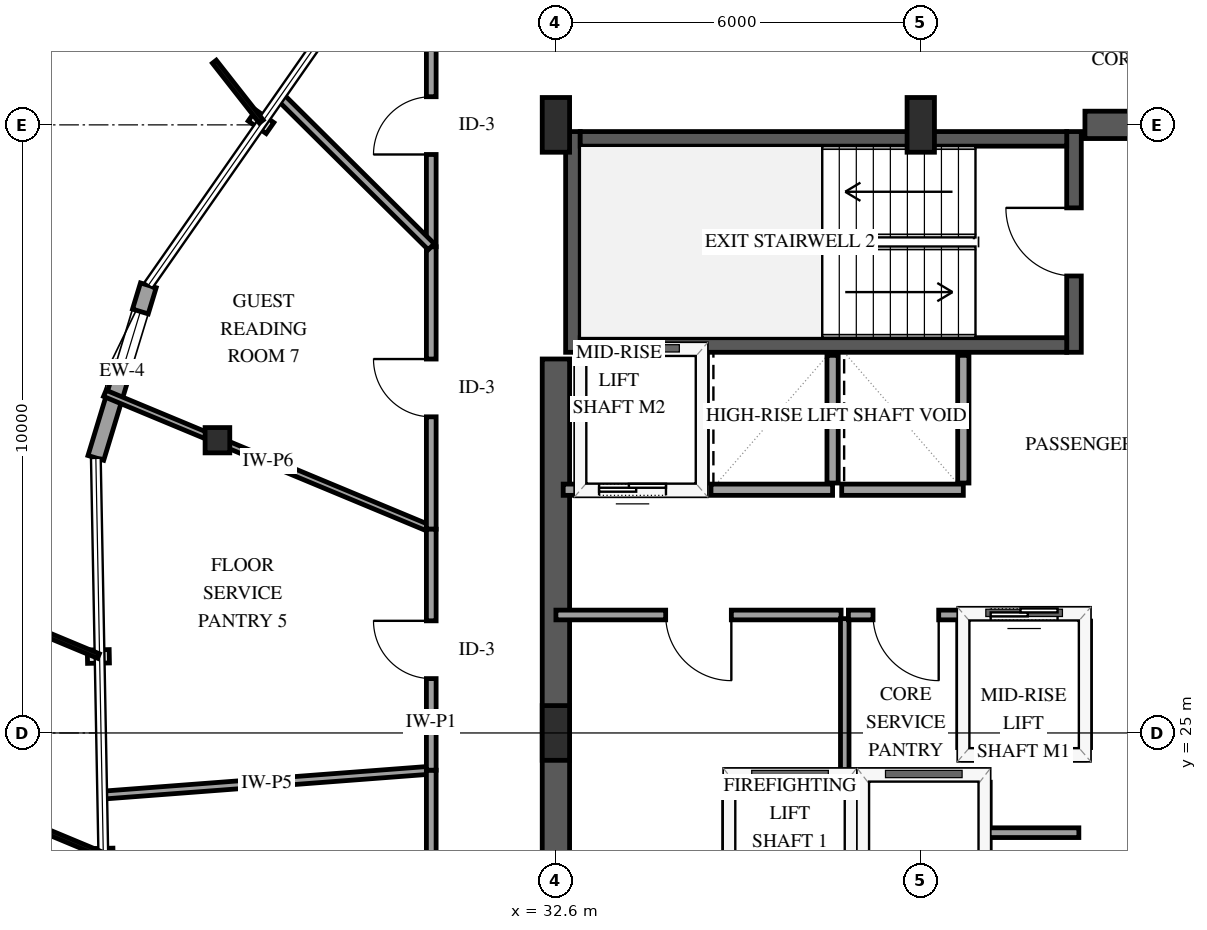
"""IFC4 building model, lengths in metres.
Left out: names, types, materials, properties, quantities, classifications, styles, units other than length and angle.
Written with IfcOpenShell. Run it as: python <this file> out.ifc"""

import sys

from ifc_helpers import new_model, si_unit, direction, frame, frame_2d, origin, origin_2d, place, context, subcontext, project, spatial, rectangle, i_section, extrude, element, fill, save


model = new_model("IFC4")
c1 = context("Model", 3, precision=1e-05, world=origin(), true_north=direction((0.0, 1.0)))
c2 = subcontext(c1, "Body", "Model", "MODEL_VIEW")
j1 = project(units=[si_unit("LENGTHUNIT", "METRE"), si_unit("PLANEANGLEUNIT", "RADIAN")], contexts=[c1])
p1 = place(None, origin())
s1 = spatial("IfcSite", under=j1, at=p1, CompositionType="ELEMENT")
p2 = place(p1, origin())
s2 = spatial("IfcBuilding", under=s1, at=p2, CompositionType="ELEMENT")
p3 = place(p2, frame((0.0, 0.0, 233.8)))
s3 = spatial("IfcBuildingStorey", under=s2, at=p3, CompositionType="ELEMENT", Elevation=233.8)
p4 = place(p3, frame((32.88, 31.26, 0.0), z_axis=(0.0, 0.0, 1.0), x_axis=(0.0, 1.0, 0.0)))
e1 = element("IfcWall", 1, at=p4, inside=s3, PredefinedType="SHEAR", context=c2, shape_type="SweptSolid", body=[
    extrude(rectangle(XDim=3.63, YDim=0.24, at=frame_2d((1.815, 0.0))), origin(), (0.0, 0.0, 1.0), 3.6),
])
p5 = place(p3, frame((41.12, 31.26, 0.0), z_axis=(0.0, 0.0, 1.0), x_axis=(0.0, 1.0, 0.0)))
e2 = element("IfcWall", 2, at=p5, inside=s3, PredefinedType="SHEAR", context=c2, shape_type="SweptSolid", body=[
    extrude(rectangle(XDim=3.63, YDim=0.24, at=frame_2d((1.815, 0.0))), origin(), (0.0, 0.0, 1.0), 3.6),
])
p6 = place(p5, frame((1.255, 0.0, 0.0)))
e3 = element("IfcOpeningElement", 3, at=p6, cuts=e2, PredefinedType="OPENING", context=c2, shape_type="SweptSolid", body=[
    extrude(rectangle(XDim=1.12, YDim=2.15, at=frame_2d((0.56, 1.075))), frame((0.0, 0.13, 0.0), z_axis=(0.0, -1.0, 0.0), x_axis=(1.0, 0.0, 0.0)), (0.0, 0.0, 1.0), 0.26),
])
for number, where, z_axis, x_axis in (
    (4, (33.0, 31.38, 0.0), (0.0, 0.0, 1.0), (1.0, 0.0, 0.0)),
    (5, (33.0, 34.77, 0.0), (0.0, 0.0, 1.0), (1.0, 0.0, 0.0)),
):
    element("IfcWall", number, at=place(p3, frame(where, z_axis=z_axis, x_axis=x_axis)), inside=s3, PredefinedType="SHEAR", context=c2, shape_type="SweptSolid", body=[
        extrude(rectangle(XDim=8.0, YDim=0.24, at=frame_2d((4.0, 0.0))), origin(), (0.0, 0.0, 1.0), 3.6),
    ])
p7 = place(p3, frame((32.6, 18.85, 0.0), z_axis=(0.0, 0.0, 1.0), x_axis=(0.0, 1.0, 0.0)))
e6 = element("IfcWall", 6, at=p7, inside=s3, PredefinedType="SHEAR", context=c2, shape_type="SweptSolid", body=[
    extrude(rectangle(XDim=12.3, YDim=0.45, at=frame_2d((6.15, 0.0))), origin(), (0.0, 0.0, 1.0), 3.6),
])
p8 = place(p3, frame((41.3, 35.0, 0.0), z_axis=(0.0, 0.0, 1.0), x_axis=(1.0, 0.0, 0.0)))
e7 = element("IfcWall", 7, at=p8, inside=s3, PredefinedType="SHEAR", context=c2, shape_type="SweptSolid", body=[
    extrude(rectangle(XDim=2.85, YDim=0.45, at=frame_2d((1.425, 0.0))), origin(), (0.0, 0.0, 1.0), 3.6),
])
for number, where, z_axis, x_axis in (
    (8, (32.6, 25.0, 0.0), (0.0, 0.0, 1.0), (1.0, 0.0, 0.0)),
    (9, (32.6, 35.0, 0.0), (0.0, 0.0, 1.0), (1.0, 0.0, 0.0)),
    (10, (38.6, 35.0, 0.0), (0.0, 0.0, 1.0), (1.0, 0.0, 0.0)),
):
    element("IfcColumn", number, at=place(p3, frame(where, z_axis=z_axis, x_axis=x_axis)), inside=s3, PredefinedType="PILASTER", context=c2, shape_type="SweptSolid", body=[
        extrude(rectangle(XDim=0.45, YDim=0.9, at=origin_2d()), origin(), (0.0, 0.0, 1.0), 3.6),
    ])
p9 = place(p3, frame((27.034, 29.814, 0.0), z_axis=(0.0, 0.0, 1.0), x_axis=(1.0, 0.0, 0.0)))
e11 = element("IfcColumn", 11, at=p9, inside=s3, PredefinedType="COLUMN", context=c2, shape_type="SweptSolid", body=[
    extrude(i_section(OverallWidth=0.406, OverallDepth=0.416, WebThickness=0.03, FlangeThickness=0.048, FilletRadius=0.038, at=origin_2d()), origin(), (0.0, 0.0, 1.0), 3.6),
])
p10 = place(p3, frame((25.897, 32.362, 0.0), z_axis=(0.0, 0.0, 1.0), x_axis=(-0.290984782506, -0.956727681396, 0.0)))
e12 = element("IfcWall", 12, at=p10, inside=s3, PredefinedType="SOLIDWALL", context=c2, shape_type="SweptSolid", body=[
    extrude(rectangle(XDim=2.967, YDim=0.27, at=frame_2d((1.483, 0.0))), origin(), (0.0, 0.0, 1.0), 2.599),
])
p11 = place(p10, frame((0.45, 0.0, 0.75)))
e13 = element("IfcOpeningElement", 13, at=p11, cuts=e12, PredefinedType="OPENING", context=c2, shape_type="SweptSolid", body=[
    extrude(rectangle(XDim=0.9, YDim=1.5, at=frame_2d((0.45, 0.75))), frame((0.0, 0.145, 0.0), z_axis=(0.0, -1.0, 0.0), x_axis=(1.0, 0.0, 0.0)), (0.0, 0.0, 1.0), 0.29),
])
p12 = place(p3, frame((35.45, 24.3, 0.0), z_axis=(0.0, 0.0, 1.0), x_axis=(1.0, 0.0, 0.0)))
e14 = element("IfcWall", 14, at=p12, inside=s3, PredefinedType="SOLIDWALL", context=c2, shape_type="SweptSolid", body=[
    extrude(rectangle(XDim=2.0, YDim=0.185, at=frame_2d((1.0, 0.0))), origin(), (0.0, 0.0, 1.0), 3.26),
])
for number, where, z_axis, x_axis in (
    (15, (35.45, 21.81, 0.0), (0.0, 0.0, 1.0), (0.0, 1.0, 0.0)),
    (16, (37.45, 21.81, 0.0), (0.0, 0.0, 1.0), (0.0, 1.0, 0.0)),
):
    element("IfcWall", number, at=place(p3, frame(where, z_axis=z_axis, x_axis=x_axis)), inside=s3, PredefinedType="SOLIDWALL", context=c2, shape_type="SweptSolid", body=[
        extrude(rectangle(XDim=2.38, YDim=0.185, at=frame_2d((1.19, 0.0))), origin(), (0.0, 0.0, 1.0), 3.26),
    ])
p13 = place(p3, frame((37.65, 24.3, 0.0), z_axis=(0.0, 0.0, 1.0), x_axis=(1.0, 0.0, 0.0)))
e17 = element("IfcWall", 17, at=p13, inside=s3, PredefinedType="SOLIDWALL", context=c2, shape_type="SweptSolid", body=[
    extrude(rectangle(XDim=2.0, YDim=0.185, at=frame_2d((1.0, 0.0))), origin(), (0.0, 0.0, 1.0), 3.26),
])
p14 = place(p3, frame((39.65, 21.81, 0.0), z_axis=(0.0, 0.0, 1.0), x_axis=(0.0, 1.0, 0.0)))
e18 = element("IfcWall", 18, at=p14, inside=s3, PredefinedType="SOLIDWALL", context=c2, shape_type="SweptSolid", body=[
    extrude(rectangle(XDim=2.38, YDim=0.185, at=frame_2d((1.19, 0.0))), origin(), (0.0, 0.0, 1.0), 3.26),
])
p15 = place(p3, frame((39.3, 24.65, 0.0), z_axis=(0.0, 0.0, 1.0), x_axis=(1.0, 0.0, 0.0)))
e19 = element("IfcWall", 19, at=p15, inside=s3, PredefinedType="SOLIDWALL", context=c2, shape_type="SweptSolid", body=[
    extrude(rectangle(XDim=2.0, YDim=0.185, at=frame_2d((1.0, 0.0))), origin(), (0.0, 0.0, 1.0), 3.26),
])
p16 = place(p3, frame((39.3, 26.95, 0.0), z_axis=(0.0, 0.0, 1.0), x_axis=(1.0, 0.0, 0.0)))
e20 = element("IfcWall", 20, at=p16, inside=s3, PredefinedType="SOLIDWALL", context=c2, shape_type="SweptSolid", body=[
    extrude(rectangle(XDim=2.0, YDim=0.185, at=frame_2d((1.0, 0.0))), origin(), (0.0, 0.0, 1.0), 3.26),
])
p17 = place(p16, frame((0.45, 0.0, 0.0)))
e21 = element("IfcOpeningElement", 21, at=p17, cuts=e20, PredefinedType="OPENING", context=c2, shape_type="SweptSolid", body=[
    extrude(rectangle(XDim=1.1, YDim=2.15, at=frame_2d((0.55, 1.075))), frame((0.0, 0.103, 0.0), z_axis=(0.0, -1.0, 0.0), x_axis=(1.0, 0.0, 0.0)), (0.0, 0.0, 1.0), 0.205),
])
for number, where, z_axis, x_axis in (
    (22, (39.3, 24.76, 0.0), (0.0, 0.0, 1.0), (0.0, 1.0, 0.0)),
    (23, (41.3, 24.76, 0.0), (0.0, 0.0, 1.0), (0.0, 1.0, 0.0)),
):
    element("IfcWall", number, at=place(p3, frame(where, z_axis=z_axis, x_axis=x_axis)), inside=s3, PredefinedType="SOLIDWALL", context=c2, shape_type="SweptSolid", body=[
        extrude(rectangle(XDim=2.08, YDim=0.185, at=frame_2d((1.04, 0.0))), origin(), (0.0, 0.0, 1.0), 3.26),
    ])
p18 = place(p3, frame((32.72, 29.0, 0.0), z_axis=(0.0, 0.0, 1.0), x_axis=(1.0, 0.0, 0.0)))
e24 = element("IfcWall", 24, at=p18, inside=s3, PredefinedType="SOLIDWALL", context=c2, shape_type="SweptSolid", body=[
    extrude(rectangle(XDim=2.28, YDim=0.185, at=frame_2d((1.14, 0.0))), origin(), (0.0, 0.0, 1.0), 3.26),
])
p19 = place(p18, frame((0.59, 0.0, 0.0)))
e25 = element("IfcOpeningElement", 25, at=p19, cuts=e24, PredefinedType="OPENING", context=c2, shape_type="SweptSolid", body=[
    extrude(rectangle(XDim=1.1, YDim=2.15, at=frame_2d((0.55, 1.075))), frame((0.0, 0.103, 0.0), z_axis=(0.0, -1.0, 0.0), x_axis=(1.0, 0.0, 0.0)), (0.0, 0.0, 1.0), 0.205),
])
p20 = place(p3, frame((35.0, 29.11, 0.0), z_axis=(0.0, 0.0, 1.0), x_axis=(0.0, 1.0, 0.0)))
e26 = element("IfcWall", 26, at=p20, inside=s3, PredefinedType="SOLIDWALL", context=c2, shape_type="SweptSolid", body=[
    extrude(rectangle(XDim=2.1, YDim=0.185, at=frame_2d((1.05, 0.0))), origin(), (0.0, 0.0, 1.0), 3.26),
])
p21 = place(p3, frame((35.15, 29.0, 0.0), z_axis=(0.0, 0.0, 1.0), x_axis=(1.0, 0.0, 0.0)))
e27 = element("IfcWall", 27, at=p21, inside=s3, PredefinedType="SOLIDWALL", context=c2, shape_type="SweptSolid", body=[
    extrude(rectangle(XDim=2.0, YDim=0.185, at=frame_2d((1.0, 0.0))), origin(), (0.0, 0.0, 1.0), 3.26),
])
p22 = place(p3, frame((37.15, 29.11, 0.0), z_axis=(0.0, 0.0, 1.0), x_axis=(0.0, 1.0, 0.0)))
e28 = element("IfcWall", 28, at=p22, inside=s3, PredefinedType="SOLIDWALL", context=c2, shape_type="SweptSolid", body=[
    extrude(rectangle(XDim=2.1, YDim=0.185, at=frame_2d((1.05, 0.0))), origin(), (0.0, 0.0, 1.0), 3.26),
])
p23 = place(p3, frame((37.3, 29.0, 0.0), z_axis=(0.0, 0.0, 1.0), x_axis=(1.0, 0.0, 0.0)))
e29 = element("IfcWall", 29, at=p23, inside=s3, PredefinedType="SOLIDWALL", context=c2, shape_type="SweptSolid", body=[
    extrude(rectangle(XDim=2.0, YDim=0.185, at=frame_2d((1.0, 0.0))), origin(), (0.0, 0.0, 1.0), 3.26),
])
p24 = place(p3, frame((39.3, 29.11, 0.0), z_axis=(0.0, 0.0, 1.0), x_axis=(0.0, 1.0, 0.0)))
e30 = element("IfcWall", 30, at=p24, inside=s3, PredefinedType="SOLIDWALL", context=c2, shape_type="SweptSolid", body=[
    extrude(rectangle(XDim=2.1, YDim=0.185, at=frame_2d((1.05, 0.0))), origin(), (0.0, 0.0, 1.0), 3.26),
])
p25 = place(p3, frame((30.55, 28.351, 0.0), z_axis=(0.0, 0.0, 1.0), x_axis=(-0.923250747002, 0.38419794138, 0.0)))
e31 = element("IfcWall", 31, at=p25, inside=s3, PredefinedType="PARTITIONING", context=c2, shape_type="SweptSolid", body=[
    extrude(rectangle(XDim=5.814, YDim=0.11, at=frame_2d((2.907, 0.0))), origin(), (0.0, 0.0, 1.0), 3.26),
])
p26 = place(p3, frame((30.55, 24.388, 0.0), z_axis=(0.0, 0.0, 1.0), x_axis=(-0.997129425625, -0.075715972899, 0.0)))
e32 = element("IfcWall", 32, at=p26, inside=s3, PredefinedType="PARTITIONING", context=c2, shape_type="SweptSolid", body=[
    extrude(rectangle(XDim=5.427, YDim=0.13, at=frame_2d((2.713, 0.0))), origin(), (0.0, 0.0, 1.0), 3.26),
])
p27 = place(p3, frame((37.29, 26.94, 0.0), z_axis=(0.0, 0.0, 1.0), x_axis=(-1.0, 0.0, 0.0)))
e33 = element("IfcWall", 33, at=p27, inside=s3, PredefinedType="PARTITIONING", context=c2, shape_type="SweptSolid", body=[
    extrude(rectangle(XDim=4.69, YDim=0.16, at=frame_2d((2.345, 0.0))), origin(), (0.0, 0.0, 1.0), 3.26),
])
p28 = place(p27, frame((1.805, 0.0, 0.0)))
e34 = element("IfcOpeningElement", 34, at=p28, cuts=e33, PredefinedType="OPENING", context=c2, shape_type="SweptSolid", body=[
    extrude(rectangle(XDim=1.08, YDim=2.15, at=frame_2d((0.54, 1.075))), frame((0.0, 0.09, 0.0), z_axis=(0.0, -1.0, 0.0), x_axis=(1.0, 0.0, 0.0)), (0.0, 0.0, 1.0), 0.18),
])
p29 = place(p3, frame((30.55, 28.351, 0.0), z_axis=(0.0, 0.0, 1.0), x_axis=(0.0, 1.0, 0.0)))
e35 = element("IfcWall", 35, at=p29, inside=s3, PredefinedType="PARTITIONING", context=c2, shape_type="SweptSolid", body=[
    extrude(rectangle(XDim=4.645, YDim=0.16, at=frame_2d((2.323, 0.0))), origin(), (0.0, 0.0, 1.0), 3.26),
])
p30 = place(p29, frame((1.848, 0.0, 0.0)))
e36 = element("IfcOpeningElement", 36, at=p30, cuts=e35, PredefinedType="OPENING", context=c2, shape_type="SweptSolid", body=[
    extrude(rectangle(XDim=0.95, YDim=2.15, at=frame_2d((0.475, 1.075))), frame((0.0, 0.09, 0.0), z_axis=(0.0, -1.0, 0.0), x_axis=(1.0, 0.0, 0.0)), (0.0, 0.0, 1.0), 0.18),
])
p31 = place(p3, frame((30.55, 20.106, 0.0), z_axis=(0.0, 0.0, 1.0), x_axis=(0.0, 1.0, 0.0)))
e37 = element("IfcWall", 37, at=p31, inside=s3, PredefinedType="PARTITIONING", context=c2, shape_type="SweptSolid", body=[
    extrude(rectangle(XDim=4.282, YDim=0.16, at=frame_2d((2.141, 0.0))), origin(), (0.0, 0.0, 1.0), 3.26),
])
p32 = place(p31, frame((1.666, 0.0, 0.0)))
e38 = element("IfcOpeningElement", 38, at=p32, cuts=e37, PredefinedType="OPENING", context=c2, shape_type="SweptSolid", body=[
    extrude(rectangle(XDim=0.95, YDim=2.15, at=frame_2d((0.475, 1.075))), frame((0.0, 0.09, 0.0), z_axis=(0.0, -1.0, 0.0), x_axis=(1.0, 0.0, 0.0)), (0.0, 0.0, 1.0), 0.18),
])
p33 = place(p3, frame((30.55, 32.996, 0.0), z_axis=(0.0, 0.0, 1.0), x_axis=(0.0, 1.0, 0.0)))
e39 = element("IfcWall", 39, at=p33, inside=s3, PredefinedType="PARTITIONING", context=c2, shape_type="SweptSolid", body=[
    extrude(rectangle(XDim=3.984, YDim=0.16, at=frame_2d((1.992, 0.0))), origin(), (0.0, 0.0, 1.0), 3.26),
])
p34 = place(p33, frame((1.517, 0.0, 0.0)))
e40 = element("IfcOpeningElement", 40, at=p34, cuts=e39, PredefinedType="OPENING", context=c2, shape_type="SweptSolid", body=[
    extrude(rectangle(XDim=0.95, YDim=2.15, at=frame_2d((0.475, 1.075))), frame((0.0, 0.09, 0.0), z_axis=(0.0, -1.0, 0.0), x_axis=(1.0, 0.0, 0.0)), (0.0, 0.0, 1.0), 0.18),
])
p35 = place(p3, frame((30.55, 24.388, 0.0), z_axis=(0.0, 0.0, 1.0), x_axis=(0.0, 1.0, 0.0)))
e41 = element("IfcWall", 41, at=p35, inside=s3, PredefinedType="PARTITIONING", context=c2, shape_type="SweptSolid", body=[
    extrude(rectangle(XDim=3.963, YDim=0.16, at=frame_2d((1.981, 0.0))), origin(), (0.0, 0.0, 1.0), 3.26),
])
p36 = place(p35, frame((1.506, 0.0, 0.0)))
e42 = element("IfcOpeningElement", 42, at=p36, cuts=e41, PredefinedType="OPENING", context=c2, shape_type="SweptSolid", body=[
    extrude(rectangle(XDim=0.95, YDim=2.15, at=frame_2d((0.475, 1.075))), frame((0.0, 0.09, 0.0), z_axis=(0.0, -1.0, 0.0), x_axis=(1.0, 0.0, 0.0)), (0.0, 0.0, 1.0), 0.18),
])
p37 = place(p3, frame((30.55, 32.996, 0.0), z_axis=(0.0, 0.0, 1.0), x_axis=(-0.709819036823, 0.704384081992, 0.0)))
e43 = element("IfcWall", 43, at=p37, inside=s3, PredefinedType="PARTITIONING", context=c2, shape_type="SweptSolid", body=[
    extrude(rectangle(XDim=3.504, YDim=0.14, at=frame_2d((1.752, 0.0))), origin(), (0.0, 0.0, 1.0), 3.26),
])
p38 = place(p3, frame((37.35, 26.88, 0.0), z_axis=(0.0, 0.0, 1.0), x_axis=(0.0, -1.0, 0.0)))
e44 = element("IfcWall", 44, at=p38, inside=s3, PredefinedType="PARTITIONING", context=c2, shape_type="SweptSolid", body=[
    extrude(rectangle(XDim=2.58, YDim=0.14, at=frame_2d((1.29, 0.0))), origin(), (0.0, 0.0, 1.0), 3.26),
])
p39 = place(p3, frame((39.3, 26.94, 0.0), z_axis=(0.0, 0.0, 1.0), x_axis=(-1.0, 0.0, 0.0)))
e45 = element("IfcWall", 45, at=p39, inside=s3, PredefinedType="PARTITIONING", context=c2, shape_type="SweptSolid", body=[
    extrude(rectangle(XDim=1.89, YDim=0.16, at=frame_2d((0.945, 0.0))), origin(), (0.0, 0.0, 1.0), 3.26),
])
p40 = place(p39, frame((0.405, 0.0, 0.0)))
e46 = element("IfcOpeningElement", 46, at=p40, cuts=e45, PredefinedType="OPENING", context=c2, shape_type="SweptSolid", body=[
    extrude(rectangle(XDim=1.08, YDim=2.15, at=frame_2d((0.54, 1.075))), frame((0.0, 0.09, 0.0), z_axis=(0.0, -1.0, 0.0), x_axis=(1.0, 0.0, 0.0)), (0.0, 0.0, 1.0), 0.18),
])
p41 = place(p3, frame((41.2, 23.36, 0.0), z_axis=(0.0, 0.0, 1.0), x_axis=(-1.0, 0.0, 0.0)))
e47 = element("IfcWall", 47, at=p41, inside=s3, PredefinedType="PARTITIONING", context=c2, shape_type="SweptSolid", body=[
    extrude(rectangle(XDim=1.48, YDim=0.16, at=frame_2d((0.74, 0.0))), origin(), (0.0, 0.0, 1.0), 3.26),
])
p42 = place(p11, origin())
e48 = element("IfcWindow", 48, at=p42, inside=s3, PartitioningType="SINGLE_PANEL", PredefinedType="WINDOW", context=c2, shape_type="SweptSolid", body=[
    extrude(rectangle(XDim=0.9, YDim=1.5, at=frame_2d((0.45, 0.75))), frame((0.0, 0.03, 0.0), z_axis=(0.0, -1.0, 0.0), x_axis=(1.0, 0.0, 0.0)), (0.0, 0.0, 1.0), 0.06),
])
fill(e13, e48)
p43 = place(p17, origin())
e49 = element("IfcDoor", 49, at=p43, inside=s3, OperationType="SLIDING_TO_LEFT", PredefinedType="DOOR", context=c2, shape_type="SweptSolid", body=[
    extrude(rectangle(XDim=1.1, YDim=2.15, at=frame_2d((0.55, 1.075))), frame((0.0, 0.025, 0.0), z_axis=(0.0, -1.0, 0.0), x_axis=(1.0, 0.0, 0.0)), (0.0, 0.0, 1.0), 0.05),
])
fill(e21, e49)
p44 = place(p19, origin())
e50 = element("IfcDoor", 50, at=p44, inside=s3, OperationType="SLIDING_TO_LEFT", PredefinedType="DOOR", context=c2, shape_type="SweptSolid", body=[
    extrude(rectangle(XDim=1.1, YDim=2.15, at=frame_2d((0.55, 1.075))), frame((0.0, 0.025, 0.0), z_axis=(0.0, -1.0, 0.0), x_axis=(1.0, 0.0, 0.0)), (0.0, 0.0, 1.0), 0.05),
])
fill(e25, e50)
p45 = place(p6, origin())
e51 = element("IfcDoor", 51, at=p45, inside=s3, OperationType="SINGLE_SWING_RIGHT", PredefinedType="DOOR", context=c2, shape_type="SweptSolid", body=[
    extrude(rectangle(XDim=1.12, YDim=2.15, at=frame_2d((0.56, 1.075))), frame((0.0, 0.025, 0.0), z_axis=(0.0, -1.0, 0.0), x_axis=(1.0, 0.0, 0.0)), (0.0, 0.0, 1.0), 0.05),
])
fill(e3, e51)
p46 = place(p28, origin())
e52 = element("IfcDoor", 52, at=p46, inside=s3, OperationType="SINGLE_SWING_LEFT", PredefinedType="DOOR", context=c2, shape_type="SweptSolid", body=[
    extrude(rectangle(XDim=1.08, YDim=2.15, at=frame_2d((0.54, 1.075))), frame((0.0, 0.025, 0.0), z_axis=(0.0, -1.0, 0.0), x_axis=(1.0, 0.0, 0.0)), (0.0, 0.0, 1.0), 0.05),
])
fill(e34, e52)
p47 = place(p30, origin())
e53 = element("IfcDoor", 53, at=p47, inside=s3, OperationType="SINGLE_SWING_RIGHT", PredefinedType="DOOR", context=c2, shape_type="SweptSolid", body=[
    extrude(rectangle(XDim=0.95, YDim=2.15, at=frame_2d((0.475, 1.075))), frame((0.0, 0.025, 0.0), z_axis=(0.0, -1.0, 0.0), x_axis=(1.0, 0.0, 0.0)), (0.0, 0.0, 1.0), 0.05),
])
fill(e36, e53)
p48 = place(p34, origin())
e54 = element("IfcDoor", 54, at=p48, inside=s3, OperationType="SINGLE_SWING_LEFT", PredefinedType="DOOR", context=c2, shape_type="SweptSolid", body=[
    extrude(rectangle(XDim=0.95, YDim=2.15, at=frame_2d((0.475, 1.075))), frame((0.0, 0.025, 0.0), z_axis=(0.0, -1.0, 0.0), x_axis=(1.0, 0.0, 0.0)), (0.0, 0.0, 1.0), 0.05),
])
fill(e40, e54)
p49 = place(p36, origin())
e55 = element("IfcDoor", 55, at=p49, inside=s3, OperationType="SINGLE_SWING_RIGHT", PredefinedType="DOOR", context=c2, shape_type="SweptSolid", body=[
    extrude(rectangle(XDim=0.95, YDim=2.15, at=frame_2d((0.475, 1.075))), frame((0.0, 0.025, 0.0), z_axis=(0.0, -1.0, 0.0), x_axis=(1.0, 0.0, 0.0)), (0.0, 0.0, 1.0), 0.05),
])
fill(e42, e55)
p50 = place(p40, origin())
e56 = element("IfcDoor", 56, at=p50, inside=s3, OperationType="SINGLE_SWING_LEFT", PredefinedType="DOOR", context=c2, shape_type="SweptSolid", body=[
    extrude(rectangle(XDim=1.08, YDim=2.15, at=frame_2d((0.54, 1.075))), frame((0.0, 0.025, 0.0), z_axis=(0.0, -1.0, 0.0), x_axis=(1.0, 0.0, 0.0)), (0.0, 0.0, 1.0), 0.05),
])
fill(e46, e56)
save(model, sys.argv[1])
